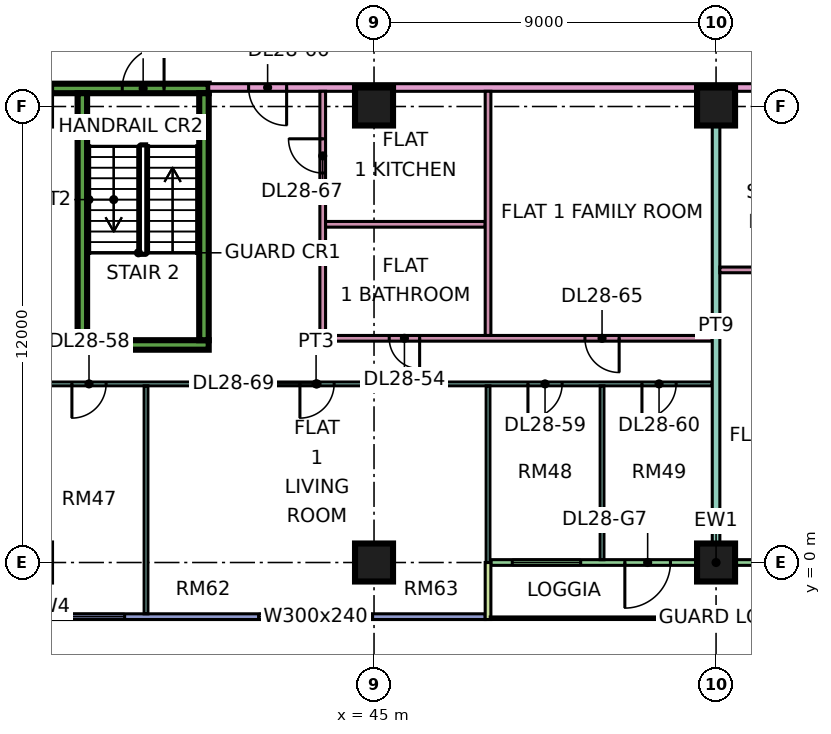
"""IFC4 building model, lengths in metres.
Left out: names, types, materials, properties, quantities, classifications, styles, units other than length and angle.
Written with IfcOpenShell. Run it as: python <this file> out.ifc"""

import sys

from ifc_helpers import new_model, si_unit, direction, frame, frame_2d, origin, origin_2d, place, context, subcontext, project, spatial, rectangle, extrude, element, fill, save


model = new_model("IFC4")
c1 = context("Model", 3, precision=1e-05, world=origin(), true_north=direction((0.0, 1.0)))
c2 = subcontext(c1, "Body", "Model", "MODEL_VIEW")
j1 = project(units=[si_unit("LENGTHUNIT", "METRE"), si_unit("PLANEANGLEUNIT", "RADIAN")], contexts=[c1])
p1 = place(None, origin())
s1 = spatial("IfcSite", under=j1, at=p1, CompositionType="ELEMENT")
p2 = place(p1, origin())
s2 = spatial("IfcBuilding", under=s1, at=p2, CompositionType="ELEMENT")
p3 = place(p2, frame((0.0, 0.0, 121.9)))
s3 = spatial("IfcBuildingStorey", under=s2, at=p3, CompositionType="ELEMENT", Elevation=121.9)
for number, where, z_axis, x_axis in (
    (1, (45.0, 0.0, 0.0), (0.0, 0.0, 1.0), (1.0, 0.0, 0.0)),
    (2, (45.0, 12.0, 0.0), (0.0, 0.0, 1.0), (1.0, 0.0, 0.0)),
    (3, (54.0, 0.0, 0.0), (0.0, 0.0, 1.0), (1.0, 0.0, 0.0)),
    (4, (54.0, 12.0, 0.0), (0.0, 0.0, 1.0), (1.0, 0.0, 0.0)),
):
    element("IfcColumn", number, at=place(p3, frame(where, z_axis=z_axis, x_axis=x_axis)), inside=s3, PredefinedType="COLUMN", context=c2, shape_type="SweptSolid", body=[
        extrude(rectangle(XDim=1.0, YDim=1.0, at=origin_2d()), origin(), (0.0, 0.0, 1.0), 3.75),
    ])
p4 = place(p3, frame((37.2, 5.725, 0.0), z_axis=(0.0, 0.0, 1.0), x_axis=(1.0, 0.0, 0.0)))
e5 = element("IfcWall", 5, at=p4, inside=s3, PredefinedType="SHEAR", context=c2, shape_type="SweptSolid", body=[
    extrude(rectangle(XDim=3.45, YDim=0.25, at=frame_2d((1.725, 0.0))), origin(), (0.0, 0.0, 1.0), 3.75),
])
p5 = place(p3, frame((36.5, 12.475, 0.0), z_axis=(0.0, 0.0, 1.0), x_axis=(1.0, 0.0, 0.0)))
e6 = element("IfcWall", 6, at=p5, inside=s3, PredefinedType="SHEAR", context=c2, shape_type="SweptSolid", body=[
    extrude(rectangle(XDim=4.15, YDim=0.25, at=frame_2d((2.075, 0.0))), origin(), (0.0, 0.0, 1.0), 3.75),
])
p6 = place(p5, frame((1.875, 0.0, 0.0)))
e7 = element("IfcOpeningElement", 7, at=p6, cuts=e6, PredefinedType="OPENING", context=c2, shape_type="SweptSolid", body=[
    extrude(rectangle(XDim=1.1, YDim=2.2, at=frame_2d((0.55, 1.1))), frame((0.0, 0.135, 0.0), z_axis=(0.0, -1.0, 0.0), x_axis=(1.0, 0.0, 0.0)), (0.0, 0.0, 1.0), 0.27),
])
for number, where, z_axis, x_axis in (
    (8, (37.325, 5.85, 0.0), (0.0, 0.0, 1.0), (0.0, 1.0, 0.0)),
    (9, (40.525, 5.85, 0.0), (0.0, 0.0, 1.0), (0.0, 1.0, 0.0)),
):
    element("IfcWall", number, at=place(p3, frame(where, z_axis=z_axis, x_axis=x_axis)), inside=s3, PredefinedType="SHEAR", context=c2, shape_type="SweptSolid", body=[
        extrude(rectangle(XDim=6.5, YDim=0.25, at=frame_2d((3.25, 0.0))), origin(), (0.0, 0.0, 1.0), 3.75),
    ])
p7 = place(p3, frame((36.075, -1.425, 0.0), z_axis=(0.0, 0.0, 1.0), x_axis=(1.0, 0.0, 0.0)))
e10 = element("IfcWall", 10, at=p7, inside=s3, PredefinedType="SOLIDWALL", context=c2, shape_type="SweptSolid", body=[
    extrude(rectangle(XDim=11.85, YDim=0.15, at=frame_2d((5.925, 0.0))), origin(), (0.0, 0.0, 1.0), 3.35),
])
p8 = place(p7, frame((0.562, 0.0, 0.45)))
e11 = element("IfcOpeningElement", 11, at=p8, cuts=e10, PredefinedType="OPENING", context=c2, shape_type="SweptSolid", body=[
    extrude(rectangle(XDim=1.8, YDim=2.4, at=frame_2d((0.9, 1.2))), frame((0.0, 0.085, 0.0), z_axis=(0.0, -1.0, 0.0), x_axis=(1.0, 0.0, 0.0)), (0.0, 0.0, 1.0), 0.17),
])
p9 = place(p7, frame((5.887, 0.0, 0.45)))
e12 = element("IfcOpeningElement", 12, at=p9, cuts=e10, PredefinedType="OPENING", context=c2, shape_type="SweptSolid", body=[
    extrude(rectangle(XDim=3.0, YDim=2.4, at=frame_2d((1.5, 1.2))), frame((0.0, 0.085, 0.0), z_axis=(0.0, -1.0, 0.0), x_axis=(1.0, 0.0, 0.0)), (0.0, 0.0, 1.0), 0.17),
])
p10 = place(p3, frame((48.075, 0.0, 0.0), z_axis=(0.0, 0.0, 1.0), x_axis=(1.0, 0.0, 0.0)))
e13 = element("IfcWall", 13, at=p10, inside=s3, PredefinedType="SOLIDWALL", context=c2, shape_type="SweptSolid", body=[
    extrude(rectangle(XDim=11.85, YDim=0.15, at=frame_2d((5.925, 0.0))), origin(), (0.0, 0.0, 1.0), 3.35),
])
p11 = place(p10, frame((0.562, 0.0, 0.45)))
e14 = element("IfcOpeningElement", 14, at=p11, cuts=e13, PredefinedType="OPENING", context=c2, shape_type="SweptSolid", body=[
    extrude(rectangle(XDim=1.8, YDim=2.4, at=frame_2d((0.9, 1.2))), frame((0.0, 0.085, 0.0), z_axis=(0.0, -1.0, 0.0), x_axis=(1.0, 0.0, 0.0)), (0.0, 0.0, 1.0), 0.17),
])
p12 = place(p10, frame((3.525, 0.0, 0.0)))
e15 = element("IfcOpeningElement", 15, at=p12, cuts=e13, PredefinedType="OPENING", context=c2, shape_type="SweptSolid", body=[
    extrude(rectangle(XDim=1.2, YDim=2.4, at=frame_2d((0.6, 1.2))), frame((0.0, 0.085, 0.0), z_axis=(0.0, -1.0, 0.0), x_axis=(1.0, 0.0, 0.0)), (0.0, 0.0, 1.0), 0.17),
])
p13 = place(p10, frame((7.688, 0.0, 0.45)))
e16 = element("IfcOpeningElement", 16, at=p13, cuts=e13, PredefinedType="OPENING", context=c2, shape_type="SweptSolid", body=[
    extrude(rectangle(XDim=3.0, YDim=2.4, at=frame_2d((1.5, 1.2))), frame((0.0, 0.085, 0.0), z_axis=(0.0, -1.0, 0.0), x_axis=(1.0, 0.0, 0.0)), (0.0, 0.0, 1.0), 0.17),
])
p14 = place(p3, frame((48.0, -1.5, 0.0), z_axis=(0.0, 0.0, 1.0), x_axis=(0.0, 1.0, 0.0)))
e17 = element("IfcWall", 17, at=p14, inside=s3, PredefinedType="SOLIDWALL", context=c2, shape_type="SweptSolid", body=[
    extrude(rectangle(XDim=1.5, YDim=0.15, at=frame_2d((0.75, 0.0))), origin(), (0.0, 0.0, 1.0), 3.35),
])
p15 = place(p3, frame((33.05, 4.7, 0.0), z_axis=(0.0, 0.0, 1.0), x_axis=(1.0, 0.0, 0.0)))
e18 = element("IfcWall", 18, at=p15, inside=s3, PredefinedType="PARTITIONING", context=c2, shape_type="SweptSolid", body=[
    extrude(rectangle(XDim=20.85, YDim=0.1, at=frame_2d((10.425, 0.0))), origin(), (0.0, 0.0, 1.0), 3.35),
])
p16 = place(p15, frame((1.0, 0.0, 0.0)))
e19 = element("IfcOpeningElement", 19, at=p16, cuts=e18, PredefinedType="OPENING", context=c2, shape_type="SweptSolid", body=[
    extrude(rectangle(XDim=0.9, YDim=2.1, at=frame_2d((0.45, 1.05))), frame((0.0, 0.06, 0.0), z_axis=(0.0, -1.0, 0.0), x_axis=(1.0, 0.0, 0.0)), (0.0, 0.0, 1.0), 0.12),
])
p17 = place(p15, frame((4.0, 0.0, 0.0)))
e20 = element("IfcOpeningElement", 20, at=p17, cuts=e18, PredefinedType="OPENING", context=c2, shape_type="SweptSolid", body=[
    extrude(rectangle(XDim=0.9, YDim=2.1, at=frame_2d((0.45, 1.05))), frame((0.0, 0.06, 0.0), z_axis=(0.0, -1.0, 0.0), x_axis=(1.0, 0.0, 0.0)), (0.0, 0.0, 1.0), 0.12),
])
p18 = place(p15, frame((16.0, 0.0, 0.0)))
e21 = element("IfcOpeningElement", 21, at=p18, cuts=e18, PredefinedType="OPENING", context=c2, shape_type="SweptSolid", body=[
    extrude(rectangle(XDim=0.9, YDim=2.1, at=frame_2d((0.45, 1.05))), frame((0.0, 0.06, 0.0), z_axis=(0.0, -1.0, 0.0), x_axis=(1.0, 0.0, 0.0)), (0.0, 0.0, 1.0), 0.12),
])
p19 = place(p15, frame((19.0, 0.0, 0.0)))
e22 = element("IfcOpeningElement", 22, at=p19, cuts=e18, PredefinedType="OPENING", context=c2, shape_type="SweptSolid", body=[
    extrude(rectangle(XDim=0.9, YDim=2.1, at=frame_2d((0.45, 1.05))), frame((0.0, 0.06, 0.0), z_axis=(0.0, -1.0, 0.0), x_axis=(1.0, 0.0, 0.0)), (0.0, 0.0, 1.0), 0.12),
])
p20 = place(p15, frame((10.0, 0.0, 0.0)))
e23 = element("IfcOpeningElement", 23, at=p20, cuts=e18, PredefinedType="OPENING", context=c2, shape_type="SweptSolid", body=[
    extrude(rectangle(XDim=0.9, YDim=2.1, at=frame_2d((0.45, 1.05))), frame((0.0, 0.06, 0.0), z_axis=(0.0, -1.0, 0.0), x_axis=(1.0, 0.0, 0.0)), (0.0, 0.0, 1.0), 0.12),
])
p21 = place(p3, frame((39.0, -1.35, 0.0), z_axis=(0.0, 0.0, 1.0), x_axis=(0.0, 1.0, 0.0)))
e24 = element("IfcWall", 24, at=p21, inside=s3, PredefinedType="PARTITIONING", context=c2, shape_type="SweptSolid", body=[
    extrude(rectangle(XDim=6.0, YDim=0.1, at=frame_2d((3.0, 0.0))), origin(), (0.0, 0.0, 1.0), 3.35),
])
p22 = place(p3, frame((40.65, 12.5, 0.0), z_axis=(0.0, 0.0, 1.0), x_axis=(1.0, 0.0, 0.0)))
e25 = element("IfcWall", 25, at=p22, inside=s3, PredefinedType="PARTITIONING", context=c2, shape_type="SweptSolid", body=[
    extrude(rectangle(XDim=31.35, YDim=0.2, at=frame_2d((15.675, 0.0))), origin(), (0.0, 0.0, 1.0), 3.35),
])
p23 = place(p22, frame((20.1, 0.0, 0.0)))
e26 = element("IfcOpeningElement", 26, at=p23, cuts=e25, PredefinedType="OPENING", context=c2, shape_type="SweptSolid", body=[
    extrude(rectangle(XDim=1.0, YDim=2.1, at=frame_2d((0.5, 1.05))), frame((0.0, 0.11, 0.0), z_axis=(0.0, -1.0, 0.0), x_axis=(1.0, 0.0, 0.0)), (0.0, 0.0, 1.0), 0.22),
])
p24 = place(p22, frame((1.05, 0.0, 0.0)))
e27 = element("IfcOpeningElement", 27, at=p24, cuts=e25, PredefinedType="OPENING", context=c2, shape_type="SweptSolid", body=[
    extrude(rectangle(XDim=1.0, YDim=2.1, at=frame_2d((0.5, 1.05))), frame((0.0, 0.11, 0.0), z_axis=(0.0, -1.0, 0.0), x_axis=(1.0, 0.0, 0.0)), (0.0, 0.0, 1.0), 0.22),
])
p25 = place(p3, frame((43.575, 5.9, 0.0), z_axis=(0.0, 0.0, 1.0), x_axis=(1.0, 0.0, 0.0)))
e28 = element("IfcWall", 28, at=p25, inside=s3, PredefinedType="PARTITIONING", context=c2, shape_type="SweptSolid", body=[
    extrude(rectangle(XDim=10.325, YDim=0.15, at=frame_2d((5.163, 0.0))), origin(), (0.0, 0.0, 1.0), 3.35),
])
p26 = place(p25, frame((1.825, 0.0, 0.0)))
e29 = element("IfcOpeningElement", 29, at=p26, cuts=e28, PredefinedType="OPENING", context=c2, shape_type="SweptSolid", body=[
    extrude(rectangle(XDim=0.8, YDim=2.1, at=frame_2d((0.4, 1.05))), frame((0.0, 0.085, 0.0), z_axis=(0.0, -1.0, 0.0), x_axis=(1.0, 0.0, 0.0)), (0.0, 0.0, 1.0), 0.17),
])
p27 = place(p25, frame((6.975, 0.0, 0.0)))
e30 = element("IfcOpeningElement", 30, at=p27, cuts=e28, PredefinedType="OPENING", context=c2, shape_type="SweptSolid", body=[
    extrude(rectangle(XDim=0.9, YDim=2.1, at=frame_2d((0.45, 1.05))), frame((0.0, 0.085, 0.0), z_axis=(0.0, -1.0, 0.0), x_axis=(1.0, 0.0, 0.0)), (0.0, 0.0, 1.0), 0.17),
])
p28 = place(p3, frame((43.65, 5.975, 0.0), z_axis=(0.0, 0.0, 1.0), x_axis=(0.0, 1.0, 0.0)))
e31 = element("IfcWall", 31, at=p28, inside=s3, PredefinedType="PARTITIONING", context=c2, shape_type="SweptSolid", body=[
    extrude(rectangle(XDim=6.425, YDim=0.15, at=frame_2d((3.212, 0.0))), origin(), (0.0, 0.0, 1.0), 3.35),
])
p29 = place(p28, frame((4.275, 0.0, 0.0)))
e32 = element("IfcOpeningElement", 32, at=p29, cuts=e31, PredefinedType="OPENING", context=c2, shape_type="SweptSolid", body=[
    extrude(rectangle(XDim=0.9, YDim=2.1, at=frame_2d((0.45, 1.05))), frame((0.0, 0.085, 0.0), z_axis=(0.0, -1.0, 0.0), x_axis=(1.0, 0.0, 0.0)), (0.0, 0.0, 1.0), 0.17),
])
p30 = place(p3, frame((43.725, 8.9, 0.0), z_axis=(0.0, 0.0, 1.0), x_axis=(1.0, 0.0, 0.0)))
e33 = element("IfcWall", 33, at=p30, inside=s3, PredefinedType="PARTITIONING", context=c2, shape_type="SweptSolid", body=[
    extrude(rectangle(XDim=4.2, YDim=0.15, at=frame_2d((2.1, 0.0))), origin(), (0.0, 0.0, 1.0), 3.35),
])
p31 = place(p3, frame((48.0, 0.0, 0.0), z_axis=(0.0, 0.0, 1.0), x_axis=(0.0, 1.0, 0.0)))
e34 = element("IfcWall", 34, at=p31, inside=s3, PredefinedType="PARTITIONING", context=c2, shape_type="SweptSolid", body=[
    extrude(rectangle(XDim=4.65, YDim=0.1, at=frame_2d((2.325, 0.0))), origin(), (0.0, 0.0, 1.0), 3.35),
])
p32 = place(p3, frame((48.0, 5.975, 0.0), z_axis=(0.0, 0.0, 1.0), x_axis=(0.0, 1.0, 0.0)))
e35 = element("IfcWall", 35, at=p32, inside=s3, PredefinedType="PARTITIONING", context=c2, shape_type="SweptSolid", body=[
    extrude(rectangle(XDim=6.425, YDim=0.15, at=frame_2d((3.212, 0.0))), origin(), (0.0, 0.0, 1.0), 3.35),
])
p33 = place(p3, frame((51.0, 0.074, 0.0), z_axis=(0.0, 0.0, 1.0), x_axis=(0.0, 1.0, 0.0)))
e36 = element("IfcWall", 36, at=p33, inside=s3, PredefinedType="PARTITIONING", context=c2, shape_type="SweptSolid", body=[
    extrude(rectangle(XDim=4.576, YDim=0.1, at=frame_2d((2.288, 0.0))), origin(), (0.0, 0.0, 1.0), 3.35),
])
p34 = place(p3, frame((54.0, 0.074, 0.0), z_axis=(0.0, 0.0, 1.0), x_axis=(0.0, 1.0, 0.0)))
e37 = element("IfcWall", 37, at=p34, inside=s3, PredefinedType="PARTITIONING", context=c2, shape_type="SweptSolid", body=[
    extrude(rectangle(XDim=12.326, YDim=0.2, at=frame_2d((6.163, 0.0))), origin(), (0.0, 0.0, 1.0), 3.35),
])
p35 = place(p3, frame((54.1, 7.7, 0.0), z_axis=(0.0, 0.0, 1.0), x_axis=(1.0, 0.0, 0.0)))
e38 = element("IfcWall", 38, at=p35, inside=s3, PredefinedType="PARTITIONING", context=c2, shape_type="SweptSolid", body=[
    extrude(rectangle(XDim=5.375, YDim=0.15, at=frame_2d((2.688, 0.0))), origin(), (0.0, 0.0, 1.0), 3.35),
])
p36 = place(p35, frame((1.1, 0.0, 0.0)))
e39 = element("IfcOpeningElement", 39, at=p36, cuts=e38, PredefinedType="OPENING", context=c2, shape_type="SweptSolid", body=[
    extrude(rectangle(XDim=0.9, YDim=2.1, at=frame_2d((0.45, 1.05))), frame((0.0, 0.085, 0.0), z_axis=(0.0, -1.0, 0.0), x_axis=(1.0, 0.0, 0.0)), (0.0, 0.0, 1.0), 0.17),
])
p37 = place(p8, origin())
e40 = element("IfcWindow", 40, at=p37, inside=s3, PartitioningType="SINGLE_PANEL", PredefinedType="WINDOW", context=c2, shape_type="SweptSolid", body=[
    extrude(rectangle(XDim=1.8, YDim=2.4, at=frame_2d((0.9, 1.2))), frame((0.0, 0.03, 0.0), z_axis=(0.0, -1.0, 0.0), x_axis=(1.0, 0.0, 0.0)), (0.0, 0.0, 1.0), 0.06),
])
fill(e11, e40)
p38 = place(p9, origin())
e41 = element("IfcWindow", 41, at=p38, inside=s3, PartitioningType="SINGLE_PANEL", PredefinedType="WINDOW", context=c2, shape_type="SweptSolid", body=[
    extrude(rectangle(XDim=3.0, YDim=2.4, at=frame_2d((1.5, 1.2))), frame((0.0, 0.03, 0.0), z_axis=(0.0, -1.0, 0.0), x_axis=(1.0, 0.0, 0.0)), (0.0, 0.0, 1.0), 0.06),
])
fill(e12, e41)
p39 = place(p11, origin())
e42 = element("IfcWindow", 42, at=p39, inside=s3, PartitioningType="SINGLE_PANEL", PredefinedType="WINDOW", context=c2, shape_type="SweptSolid", body=[
    extrude(rectangle(XDim=1.8, YDim=2.4, at=frame_2d((0.9, 1.2))), frame((0.0, 0.03, 0.0), z_axis=(0.0, -1.0, 0.0), x_axis=(1.0, 0.0, 0.0)), (0.0, 0.0, 1.0), 0.06),
])
fill(e14, e42)
p40 = place(p12, frame((1.2, 0.0, 0.0), z_axis=(0.0, 0.0, 1.0), x_axis=(-1.0, 0.0, 0.0)))
e43 = element("IfcDoor", 43, at=p40, inside=s3, OperationType="DOUBLE_DOOR_SINGLE_SWING", PredefinedType="DOOR", context=c2, shape_type="SweptSolid", body=[
    extrude(rectangle(XDim=1.2, YDim=2.4, at=frame_2d((0.6, 1.2))), frame((0.0, 0.025, 0.0), z_axis=(0.0, -1.0, 0.0), x_axis=(1.0, 0.0, 0.0)), (0.0, 0.0, 1.0), 0.05),
])
fill(e15, e43)
p41 = place(p6, frame((1.1, 0.0, 0.0), z_axis=(0.0, 0.0, 1.0), x_axis=(-1.0, 0.0, 0.0)))
e44 = element("IfcDoor", 44, at=p41, inside=s3, OperationType="SINGLE_SWING_RIGHT", PredefinedType="DOOR", context=c2, shape_type="SweptSolid", body=[
    extrude(rectangle(XDim=1.1, YDim=2.2, at=frame_2d((0.55, 1.1))), frame((0.0, 0.025, 0.0), z_axis=(0.0, -1.0, 0.0), x_axis=(1.0, 0.0, 0.0)), (0.0, 0.0, 1.0), 0.05),
])
fill(e7, e44)
p42 = place(p26, origin())
e45 = element("IfcDoor", 45, at=p42, inside=s3, OperationType="SINGLE_SWING_RIGHT", PredefinedType="DOOR", context=c2, shape_type="SweptSolid", body=[
    extrude(rectangle(XDim=0.8, YDim=2.1, at=frame_2d((0.4, 1.05))), frame((0.0, 0.025, 0.0), z_axis=(0.0, -1.0, 0.0), x_axis=(1.0, 0.0, 0.0)), (0.0, 0.0, 1.0), 0.05),
])
fill(e29, e45)
p43 = place(p17, frame((0.9, 0.0, 0.0), z_axis=(0.0, 0.0, 1.0), x_axis=(-1.0, 0.0, 0.0)))
e46 = element("IfcDoor", 46, at=p43, inside=s3, OperationType="SINGLE_SWING_LEFT", PredefinedType="DOOR", context=c2, shape_type="SweptSolid", body=[
    extrude(rectangle(XDim=0.9, YDim=2.1, at=frame_2d((0.45, 1.05))), frame((0.0, 0.025, 0.0), z_axis=(0.0, -1.0, 0.0), x_axis=(1.0, 0.0, 0.0)), (0.0, 0.0, 1.0), 0.05),
])
fill(e20, e46)
p44 = place(p18, frame((0.9, 0.0, 0.0), z_axis=(0.0, 0.0, 1.0), x_axis=(-1.0, 0.0, 0.0)))
e47 = element("IfcDoor", 47, at=p44, inside=s3, OperationType="SINGLE_SWING_LEFT", PredefinedType="DOOR", context=c2, shape_type="SweptSolid", body=[
    extrude(rectangle(XDim=0.9, YDim=2.1, at=frame_2d((0.45, 1.05))), frame((0.0, 0.025, 0.0), z_axis=(0.0, -1.0, 0.0), x_axis=(1.0, 0.0, 0.0)), (0.0, 0.0, 1.0), 0.05),
])
fill(e21, e47)
p45 = place(p19, frame((0.9, 0.0, 0.0), z_axis=(0.0, 0.0, 1.0), x_axis=(-1.0, 0.0, 0.0)))
e48 = element("IfcDoor", 48, at=p45, inside=s3, OperationType="SINGLE_SWING_LEFT", PredefinedType="DOOR", context=c2, shape_type="SweptSolid", body=[
    extrude(rectangle(XDim=0.9, YDim=2.1, at=frame_2d((0.45, 1.05))), frame((0.0, 0.025, 0.0), z_axis=(0.0, -1.0, 0.0), x_axis=(1.0, 0.0, 0.0)), (0.0, 0.0, 1.0), 0.05),
])
fill(e22, e48)
p46 = place(p27, origin())
e49 = element("IfcDoor", 49, at=p46, inside=s3, OperationType="SINGLE_SWING_RIGHT", PredefinedType="DOOR", context=c2, shape_type="SweptSolid", body=[
    extrude(rectangle(XDim=0.9, YDim=2.1, at=frame_2d((0.45, 1.05))), frame((0.0, 0.025, 0.0), z_axis=(0.0, -1.0, 0.0), x_axis=(1.0, 0.0, 0.0)), (0.0, 0.0, 1.0), 0.05),
])
fill(e30, e49)
p47 = place(p24, origin())
e50 = element("IfcDoor", 50, at=p47, inside=s3, OperationType="SINGLE_SWING_RIGHT", PredefinedType="DOOR", context=c2, shape_type="SweptSolid", body=[
    extrude(rectangle(XDim=1.0, YDim=2.1, at=frame_2d((0.5, 1.05))), frame((0.0, 0.025, 0.0), z_axis=(0.0, -1.0, 0.0), x_axis=(1.0, 0.0, 0.0)), (0.0, 0.0, 1.0), 0.05),
])
fill(e27, e50)
p48 = place(p29, frame((0.9, 0.0, 0.0), z_axis=(0.0, 0.0, 1.0), x_axis=(-1.0, 0.0, 0.0)))
e51 = element("IfcDoor", 51, at=p48, inside=s3, OperationType="SINGLE_SWING_RIGHT", PredefinedType="DOOR", context=c2, shape_type="SweptSolid", body=[
    extrude(rectangle(XDim=0.9, YDim=2.1, at=frame_2d((0.45, 1.05))), frame((0.0, 0.025, 0.0), z_axis=(0.0, -1.0, 0.0), x_axis=(1.0, 0.0, 0.0)), (0.0, 0.0, 1.0), 0.05),
])
fill(e32, e51)
p49 = place(p20, frame((0.9, 0.0, 0.0), z_axis=(0.0, 0.0, 1.0), x_axis=(-1.0, 0.0, 0.0)))
e52 = element("IfcDoor", 52, at=p49, inside=s3, OperationType="SINGLE_SWING_LEFT", PredefinedType="DOOR", context=c2, shape_type="SweptSolid", body=[
    extrude(rectangle(XDim=0.9, YDim=2.1, at=frame_2d((0.45, 1.05))), frame((0.0, 0.025, 0.0), z_axis=(0.0, -1.0, 0.0), x_axis=(1.0, 0.0, 0.0)), (0.0, 0.0, 1.0), 0.05),
])
fill(e23, e52)
save(model, sys.argv[1])
